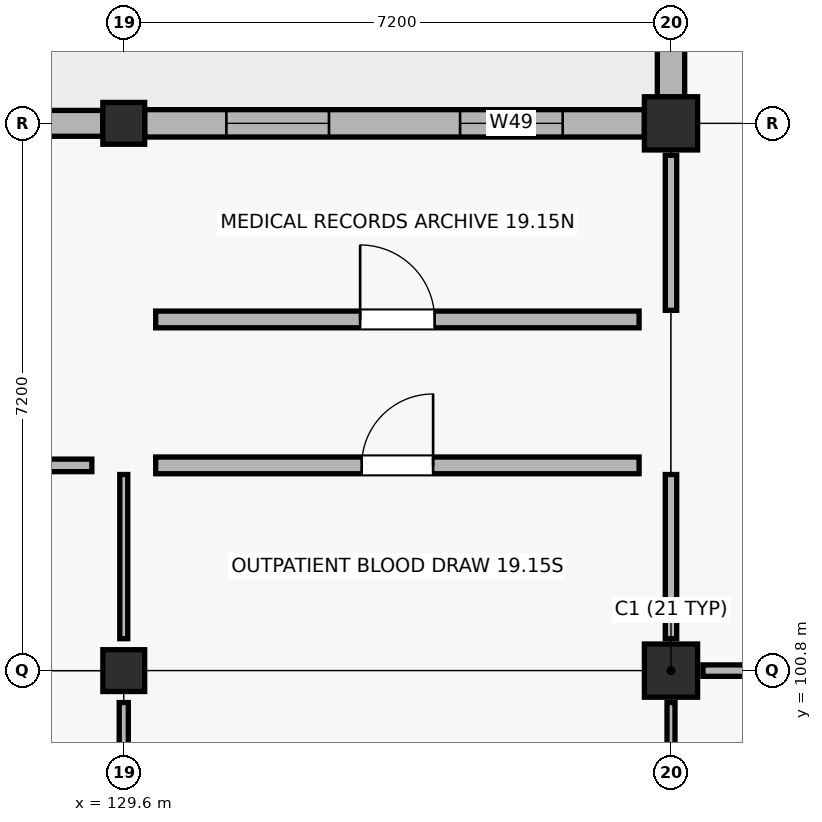
"""IFC4 building model, lengths in metres.
Left out: names, types, materials, properties, quantities, classifications, styles, units other than length and angle.
Written with IfcOpenShell. Run it as: python <this file> out.ifc"""

import sys

from ifc_helpers import new_model, si_unit, direction, frame, frame_2d, origin, origin_2d, place, context, subcontext, project, spatial, rectangle, extrude, element, fill, save


model = new_model("IFC4")
c1 = context("Model", 3, precision=1e-05, world=origin(), true_north=direction((0.0, 1.0)))
c2 = subcontext(c1, "Body", "Model", "MODEL_VIEW")
j1 = project(units=[si_unit("LENGTHUNIT", "METRE"), si_unit("PLANEANGLEUNIT", "RADIAN")], contexts=[c1])
p1 = place(None, origin())
s1 = spatial("IfcSite", under=j1, at=p1, CompositionType="ELEMENT")
p2 = place(p1, origin())
s2 = spatial("IfcBuilding", under=s1, at=p2, CompositionType="ELEMENT")
p3 = place(p2, origin())
s3 = spatial("IfcBuildingStorey", under=s2, at=p3, CompositionType="ELEMENT", Elevation=0.0)
for number, where, z_axis, x_axis in (
    (1, (129.6, 100.8, -0.25), (0.0, 0.0, 1.0), (1.0, 0.0, 0.0)),
    (2, (129.6, 108.0, -0.25), (0.0, 0.0, 1.0), (1.0, 0.0, 0.0)),
):
    element("IfcColumn", number, at=place(p3, frame(where, z_axis=z_axis, x_axis=x_axis)), inside=s3, PredefinedType="COLUMN", context=c2, shape_type="SweptSolid", body=[
        extrude(rectangle(XDim=0.55, YDim=0.55, at=origin_2d()), origin(), (0.0, 0.0, 1.0), 4.75),
    ])
for number, where, z_axis, x_axis in (
    (3, (136.8, 100.8, -0.25), (0.0, 0.0, 1.0), (1.0, 0.0, 0.0)),
    (4, (136.8, 108.0, -0.25), (0.0, 0.0, 1.0), (1.0, 0.0, 0.0)),
):
    element("IfcColumn", number, at=place(p3, frame(where, z_axis=z_axis, x_axis=x_axis)), inside=s3, PredefinedType="COLUMN", context=c2, shape_type="SweptSolid", body=[
        extrude(rectangle(XDim=0.7, YDim=0.7, at=origin_2d()), origin(), (0.0, 0.0, 1.0), 4.75),
    ])
p4 = place(p3, frame((122.675, 108.0, 0.0), z_axis=(0.0, 0.0, 1.0), x_axis=(1.0, 0.0, 0.0)))
e5 = element("IfcWall", 5, at=p4, inside=s3, PredefinedType="SOLIDWALL", context=c2, shape_type="SweptSolid", body=[
    extrude(rectangle(XDim=6.65, YDim=0.34, at=frame_2d((3.325, 0.0))), origin(), (0.0, 0.0, 1.0), 3.47),
])
p5 = place(p4, frame((2.575, 0.0, 0.0)))
e6 = element("IfcOpeningElement", 6, at=p5, cuts=e5, PredefinedType="OPENING", context=c2, shape_type="SweptSolid", body=[
    extrude(rectangle(XDim=1.5, YDim=2.2, at=frame_2d((0.75, 1.1))), frame((0.0, 0.18, 0.0), z_axis=(0.0, -1.0, 0.0), x_axis=(1.0, 0.0, 0.0)), (0.0, 0.0, 1.0), 0.36),
])
p6 = place(p3, frame((136.45, 108.0, 0.0), z_axis=(0.0, 0.0, 1.0), x_axis=(-1.0, 0.0, 0.0)))
e7 = element("IfcWall", 7, at=p6, inside=s3, PredefinedType="SOLIDWALL", context=c2, shape_type="SweptSolid", body=[
    extrude(rectangle(XDim=6.575, YDim=0.36, at=frame_2d((3.288, 0.0))), origin(), (0.0, 0.0, 1.0), 3.47),
])
p7 = place(p6, frame((1.075, 0.0, 0.9)))
e8 = element("IfcOpeningElement", 8, at=p7, cuts=e7, PredefinedType="OPENING", context=c2, shape_type="SweptSolid", body=[
    extrude(rectangle(XDim=1.35, YDim=1.88, at=frame_2d((0.675, 0.94))), frame((0.0, 0.19, 0.0), z_axis=(0.0, -1.0, 0.0), x_axis=(1.0, 0.0, 0.0)), (0.0, 0.0, 1.0), 0.38),
])
p8 = place(p6, frame((4.15, 0.0, 0.9)))
e9 = element("IfcOpeningElement", 9, at=p8, cuts=e7, PredefinedType="OPENING", context=c2, shape_type="SweptSolid", body=[
    extrude(rectangle(XDim=1.35, YDim=1.88, at=frame_2d((0.675, 0.94))), frame((0.0, 0.19, 0.0), z_axis=(0.0, -1.0, 0.0), x_axis=(1.0, 0.0, 0.0)), (0.0, 0.0, 1.0), 0.38),
])
p9 = place(p3, frame((136.8, 114.85, 0.0), z_axis=(0.0, 0.0, 1.0), x_axis=(0.0, -1.0, 0.0)))
e10 = element("IfcWall", 10, at=p9, inside=s3, PredefinedType="SOLIDWALL", context=c2, shape_type="SweptSolid", body=[
    extrude(rectangle(XDim=6.5, YDim=0.36, at=frame_2d((3.25, 0.0))), origin(), (0.0, 0.0, 1.0), 3.52),
])
p10 = place(p9, frame((0.675, 0.0, 0.9)))
e11 = element("IfcOpeningElement", 11, at=p10, cuts=e10, PredefinedType="OPENING", context=c2, shape_type="SweptSolid", body=[
    extrude(rectangle(XDim=2.15, YDim=1.25, at=frame_2d((1.075, 0.625))), frame((0.0, 0.19, 0.0), z_axis=(0.0, -1.0, 0.0), x_axis=(1.0, 0.0, 0.0)), (0.0, 0.0, 1.0), 0.38),
])
p11 = place(p9, frame((3.675, 0.0, 0.9)))
e12 = element("IfcOpeningElement", 12, at=p11, cuts=e10, PredefinedType="OPENING", context=c2, shape_type="SweptSolid", body=[
    extrude(rectangle(XDim=2.15, YDim=1.25, at=frame_2d((1.075, 0.625))), frame((0.0, 0.19, 0.0), z_axis=(0.0, -1.0, 0.0), x_axis=(1.0, 0.0, 0.0)), (0.0, 0.0, 1.0), 0.38),
])
p12 = place(p3, frame((129.6, 98.34, 0.0), z_axis=(0.0, 0.0, 1.0), x_axis=(0.0, 1.0, 0.0)))
e13 = element("IfcWall", 13, at=p12, inside=s3, PredefinedType="PARTITIONING", context=c2, shape_type="SweptSolid", body=[
    extrude(rectangle(XDim=2.04, YDim=0.12, at=frame_2d((1.02, 0.0))), origin(), (0.0, 0.0, 1.0), 3.36),
])
p13 = place(p3, frame((122.82, 103.5, 0.0), z_axis=(0.0, 0.0, 1.0), x_axis=(1.0, 0.0, 0.0)))
e14 = element("IfcWall", 14, at=p13, inside=s3, PredefinedType="PARTITIONING", context=c2, shape_type="SweptSolid", body=[
    extrude(rectangle(XDim=6.36, YDim=0.165, at=frame_2d((3.18, 0.0))), origin(), (0.0, 0.0, 1.0), 3.36),
])
p14 = place(p13, frame((2.45, 0.0, 0.0)))
e15 = element("IfcOpeningElement", 15, at=p14, cuts=e14, PredefinedType="OPENING", context=c2, shape_type="SweptSolid", body=[
    extrude(rectangle(XDim=1.46, YDim=2.14, at=frame_2d((0.73, 1.07))), frame((0.0, 0.093, 0.0), z_axis=(0.0, -1.0, 0.0), x_axis=(1.0, 0.0, 0.0)), (0.0, 0.0, 1.0), 0.185),
])
p15 = place(p3, frame((129.6, 101.22, 0.0), z_axis=(0.0, 0.0, 1.0), x_axis=(0.0, 1.0, 0.0)))
e16 = element("IfcWall", 16, at=p15, inside=s3, PredefinedType="PARTITIONING", context=c2, shape_type="SweptSolid", body=[
    extrude(rectangle(XDim=2.16, YDim=0.105, at=frame_2d((1.08, 0.0))), origin(), (0.0, 0.0, 1.0), 3.36),
])
p16 = place(p3, frame((136.8, 98.34, 0.0), z_axis=(0.0, 0.0, 1.0), x_axis=(0.0, 1.0, 0.0)))
e17 = element("IfcWall", 17, at=p16, inside=s3, PredefinedType="PARTITIONING", context=c2, shape_type="SweptSolid", body=[
    extrude(rectangle(XDim=2.04, YDim=0.105, at=frame_2d((1.02, 0.0))), origin(), (0.0, 0.0, 1.0), 3.36),
])
p17 = place(p3, frame((130.02, 103.5, 0.0), z_axis=(0.0, 0.0, 1.0), x_axis=(1.0, 0.0, 0.0)))
e18 = element("IfcWall", 18, at=p17, inside=s3, PredefinedType="SOLIDWALL", context=c2, shape_type="SweptSolid", body=[
    extrude(rectangle(XDim=6.36, YDim=0.22, at=frame_2d((3.18, 0.0))), origin(), (0.0, 0.0, 1.0), 3.36),
])
p18 = place(p17, frame((2.71, 0.0, 0.0)))
e19 = element("IfcOpeningElement", 19, at=p18, cuts=e18, PredefinedType="OPENING", context=c2, shape_type="SweptSolid", body=[
    extrude(rectangle(XDim=0.94, YDim=2.19, at=frame_2d((0.47, 1.095))), frame((0.0, 0.12, 0.0), z_axis=(0.0, -1.0, 0.0), x_axis=(1.0, 0.0, 0.0)), (0.0, 0.0, 1.0), 0.24),
])
p19 = place(p3, frame((136.8, 101.22, 0.0), z_axis=(0.0, 0.0, 1.0), x_axis=(0.0, 1.0, 0.0)))
e20 = element("IfcWall", 20, at=p19, inside=s3, PredefinedType="PARTITIONING", context=c2, shape_type="SweptSolid", body=[
    extrude(rectangle(XDim=2.16, YDim=0.15, at=frame_2d((1.08, 0.0))), origin(), (0.0, 0.0, 1.0), 3.36),
])
p20 = place(p3, frame((130.02, 105.42, 0.0), z_axis=(0.0, 0.0, 1.0), x_axis=(1.0, 0.0, 0.0)))
e21 = element("IfcWall", 21, at=p20, inside=s3, PredefinedType="SOLIDWALL", context=c2, shape_type="SweptSolid", body=[
    extrude(rectangle(XDim=6.36, YDim=0.22, at=frame_2d((3.18, 0.0))), origin(), (0.0, 0.0, 1.0), 3.36),
])
p21 = place(p20, frame((2.69, 0.0, 0.0)))
e22 = element("IfcOpeningElement", 22, at=p21, cuts=e21, PredefinedType="OPENING", context=c2, shape_type="SweptSolid", body=[
    extrude(rectangle(XDim=0.98, YDim=2.19, at=frame_2d((0.49, 1.095))), frame((0.0, 0.12, 0.0), z_axis=(0.0, -1.0, 0.0), x_axis=(1.0, 0.0, 0.0)), (0.0, 0.0, 1.0), 0.24),
])
p22 = place(p3, frame((136.8, 105.54, 0.0), z_axis=(0.0, 0.0, 1.0), x_axis=(0.0, 1.0, 0.0)))
e23 = element("IfcWall", 23, at=p22, inside=s3, PredefinedType="PARTITIONING", context=c2, shape_type="SweptSolid", body=[
    extrude(rectangle(XDim=2.04, YDim=0.15, at=frame_2d((1.02, 0.0))), origin(), (0.0, 0.0, 1.0), 3.36),
])
p23 = place(p3, frame((137.22, 100.8, 0.0), z_axis=(0.0, 0.0, 1.0), x_axis=(1.0, 0.0, 0.0)))
e24 = element("IfcWall", 24, at=p23, inside=s3, PredefinedType="PARTITIONING", context=c2, shape_type="SweptSolid", body=[
    extrude(rectangle(XDim=2.16, YDim=0.15, at=frame_2d((1.08, 0.0))), origin(), (0.0, 0.0, 1.0), 3.36),
])
p24 = place(p7, origin())
e25 = element("IfcWindow", 25, at=p24, inside=s3, PartitioningType="SINGLE_PANEL", PredefinedType="WINDOW", context=c2, shape_type="SweptSolid", body=[
    extrude(rectangle(XDim=1.35, YDim=1.88, at=frame_2d((0.675, 0.94))), frame((0.0, 0.03, 0.0), z_axis=(0.0, -1.0, 0.0), x_axis=(1.0, 0.0, 0.0)), (0.0, 0.0, 1.0), 0.06),
])
fill(e8, e25)
p25 = place(p8, origin())
e26 = element("IfcWindow", 26, at=p25, inside=s3, PartitioningType="SINGLE_PANEL", PredefinedType="WINDOW", context=c2, shape_type="SweptSolid", body=[
    extrude(rectangle(XDim=1.35, YDim=1.88, at=frame_2d((0.675, 0.94))), frame((0.0, 0.03, 0.0), z_axis=(0.0, -1.0, 0.0), x_axis=(1.0, 0.0, 0.0)), (0.0, 0.0, 1.0), 0.06),
])
fill(e9, e26)
p26 = place(p18, origin())
e27 = element("IfcDoor", 27, at=p26, inside=s3, OperationType="SINGLE_SWING_RIGHT", PredefinedType="DOOR", context=c2, shape_type="SweptSolid", body=[
    extrude(rectangle(XDim=0.94, YDim=2.19, at=frame_2d((0.47, 1.095))), frame((0.0, 0.025, 0.0), z_axis=(0.0, -1.0, 0.0), x_axis=(1.0, 0.0, 0.0)), (0.0, 0.0, 1.0), 0.05),
])
fill(e19, e27)
p27 = place(p21, origin())
e28 = element("IfcDoor", 28, at=p27, inside=s3, OperationType="SINGLE_SWING_LEFT", PredefinedType="DOOR", context=c2, shape_type="SweptSolid", body=[
    extrude(rectangle(XDim=0.98, YDim=2.19, at=frame_2d((0.49, 1.095))), frame((0.0, 0.025, 0.0), z_axis=(0.0, -1.0, 0.0), x_axis=(1.0, 0.0, 0.0)), (0.0, 0.0, 1.0), 0.05),
])
fill(e22, e28)
save(model, sys.argv[1])
